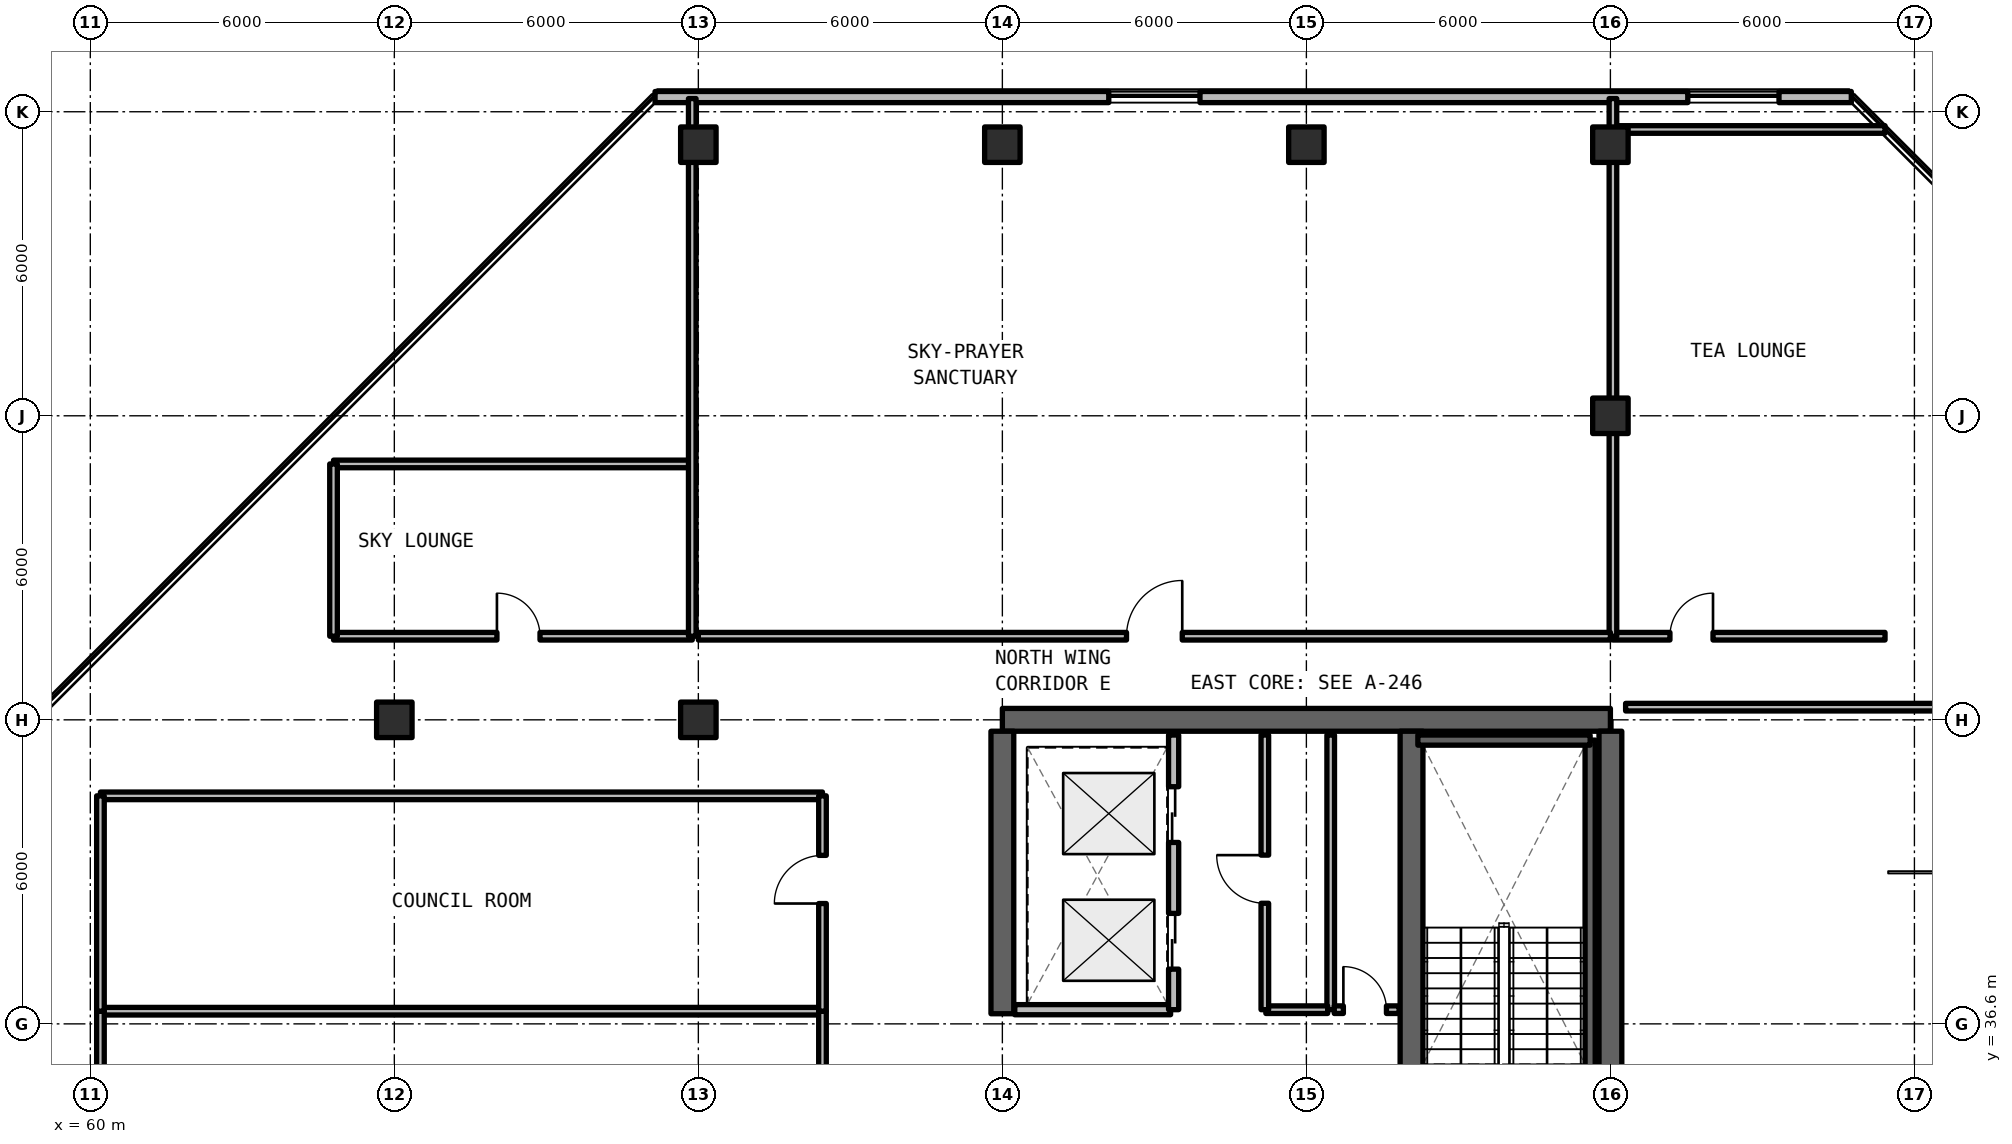
"""IFC4 building model, lengths in metres.
Left out: names, types, materials, properties, quantities, classifications, styles, units other than length and angle.
Written with IfcOpenShell. Run it as: python <this file> out.ifc"""

import sys

from ifc_helpers import new_model, si_unit, direction, frame, frame_2d, origin, origin_2d, place, context, subcontext, project, spatial, rectangle, extrude, element, fill, save


model = new_model("IFC4")
c1 = context("Model", 3, precision=1e-05, world=origin(), true_north=direction((0.0, 1.0)))
c2 = subcontext(c1, "Body", "Model", "MODEL_VIEW")
j1 = project(units=[si_unit("LENGTHUNIT", "METRE"), si_unit("PLANEANGLEUNIT", "RADIAN")], contexts=[c1])
p1 = place(None, origin())
s1 = spatial("IfcSite", under=j1, at=p1, CompositionType="ELEMENT")
p2 = place(p1, origin())
s2 = spatial("IfcBuilding", under=s1, at=p2, CompositionType="ELEMENT")
p3 = place(p2, frame((0.0, 0.0, 232.65)))
s3 = spatial("IfcBuildingStorey", under=s2, at=p3, CompositionType="ELEMENT", Elevation=232.65)
p4 = place(p3, frame((90.0, 42.6, 0.0), z_axis=(0.0, 0.0, 1.0), x_axis=(-1.0, 0.0, 0.0)))
e1 = element("IfcWall", 1, at=p4, inside=s3, PredefinedType="SHEAR", context=c2, shape_type="SweptSolid", body=[
    extrude(rectangle(XDim=12.0, YDim=0.45, at=frame_2d((6.0, 0.0))), origin(), (0.0, 0.0, 1.0), 3.3),
])
p5 = place(p3, frame((90.0, 24.825, 0.0), z_axis=(0.0, 0.0, 1.0), x_axis=(0.0, 1.0, 0.0)))
e2 = element("IfcWall", 2, at=p5, inside=s3, PredefinedType="SHEAR", context=c2, shape_type="SweptSolid", body=[
    extrude(rectangle(XDim=17.55, YDim=0.45, at=frame_2d((8.775, 0.0))), origin(), (0.0, 0.0, 1.0), 3.3),
])
p6 = place(p3, frame((78.0, 36.8, 0.0), z_axis=(0.0, 0.0, 1.0), x_axis=(0.0, 1.0, 0.0)))
e3 = element("IfcWall", 3, at=p6, inside=s3, PredefinedType="SHEAR", context=c2, shape_type="SweptSolid", body=[
    extrude(rectangle(XDim=5.575, YDim=0.45, at=frame_2d((2.788, 0.0))), origin(), (0.0, 0.0, 1.0), 3.3),
])
p7 = place(p3, frame((86.075, 24.825, 0.0), z_axis=(0.0, 0.0, 1.0), x_axis=(0.0, 1.0, 0.0)))
e4 = element("IfcWall", 4, at=p7, inside=s3, PredefinedType="SHEAR", context=c2, shape_type="SweptSolid", body=[
    extrude(rectangle(XDim=17.55, YDim=0.45, at=frame_2d((8.775, 0.0))), origin(), (0.0, 0.0, 1.0), 3.3),
])
p8 = place(p7, frame((0.425, 0.0, 0.0)))
e5 = element("IfcOpeningElement", 5, at=p8, cuts=e4, PredefinedType="OPENING", context=c2, shape_type="SweptSolid", body=[
    extrude(rectangle(XDim=1.15, YDim=2.15, at=frame_2d((0.575, 1.075))), frame((0.0, 0.235, 0.0), z_axis=(0.0, -1.0, 0.0), x_axis=(1.0, 0.0, 0.0)), (0.0, 0.0, 1.0), 0.47),
])
p9 = place(p7, frame((9.625, 0.0, 0.0)))
e6 = element("IfcOpeningElement", 6, at=p9, cuts=e4, PredefinedType="OPENING", context=c2, shape_type="SweptSolid", body=[
    extrude(rectangle(XDim=1.15, YDim=2.15, at=frame_2d((0.575, 1.075))), frame((0.0, 0.235, 0.0), z_axis=(0.0, -1.0, 0.0), x_axis=(1.0, 0.0, 0.0)), (0.0, 0.0, 1.0), 0.47),
])
for number, where, z_axis, x_axis in (
    (7, (66.0, 42.6, 0.0), (0.0, 0.0, 1.0), (1.0, 0.0, 0.0)),
    (8, (72.0, 42.6, 0.0), (0.0, 0.0, 1.0), (1.0, 0.0, 0.0)),
    (9, (90.0, 48.6, 0.0), (0.0, 0.0, 1.0), (1.0, 0.0, 0.0)),
    (10, (72.0, 53.95, 0.0), (0.0, 0.0, 1.0), (1.0, 0.0, 0.0)),
    (11, (78.0, 53.95, 0.0), (0.0, 0.0, 1.0), (1.0, 0.0, 0.0)),
    (12, (84.0, 53.95, 0.0), (0.0, 0.0, 1.0), (1.0, 0.0, 0.0)),
    (13, (90.0, 53.95, 0.0), (0.0, 0.0, 1.0), (1.0, 0.0, 0.0)),
):
    element("IfcColumn", number, at=place(p3, frame(where, z_axis=z_axis, x_axis=x_axis)), inside=s3, PredefinedType="COLUMN", context=c2, shape_type="SweptSolid", body=[
        extrude(rectangle(XDim=0.7, YDim=0.7, at=origin_2d()), origin(), (0.0, 0.0, 1.0), 3.3),
    ])
p10 = place(p3, frame((94.754, 54.89, 0.0), z_axis=(0.0, 0.0, 1.0), x_axis=(-1.0, 0.0, 0.0)))
e14 = element("IfcWall", 14, at=p10, inside=s3, PredefinedType="SOLIDWALL", context=c2, shape_type="SweptSolid", body=[
    extrude(rectangle(XDim=23.609, YDim=0.22, at=frame_2d((11.804, 0.0))), origin(), (0.0, 0.0, 1.0), 3.08),
])
p11 = place(p10, frame((1.427, 0.0, 0.78)))
e15 = element("IfcOpeningElement", 15, at=p11, cuts=e14, PredefinedType="OPENING", context=c2, shape_type="SweptSolid", body=[
    extrude(rectangle(XDim=1.8, YDim=1.66, at=frame_2d((0.9, 0.83))), frame((0.0, 0.12, 0.0), z_axis=(0.0, -1.0, 0.0), x_axis=(1.0, 0.0, 0.0)), (0.0, 0.0, 1.0), 0.24),
])
p12 = place(p10, frame((12.854, 0.0, 0.78)))
e16 = element("IfcOpeningElement", 16, at=p12, cuts=e14, PredefinedType="OPENING", context=c2, shape_type="SweptSolid", body=[
    extrude(rectangle(XDim=1.8, YDim=1.66, at=frame_2d((0.9, 0.83))), frame((0.0, 0.12, 0.0), z_axis=(0.0, -1.0, 0.0), x_axis=(1.0, 0.0, 0.0)), (0.0, 0.0, 1.0), 0.24),
])
p13 = place(p3, frame((84.48, 36.88, 0.0), z_axis=(0.0, 0.0, 1.0), x_axis=(0.0, 1.0, 0.0)))
e17 = element("IfcWall", 17, at=p13, inside=s3, PredefinedType="SOLIDWALL", context=c2, shape_type="SweptSolid", body=[
    extrude(rectangle(XDim=5.42, YDim=0.15, at=frame_2d((2.71, 0.0))), origin(), (0.0, 0.0, 1.0), 2.35),
])
p14 = place(p3, frame((84.55, 36.88, 0.0), z_axis=(0.0, 0.0, 1.0), x_axis=(1.0, 0.0, 0.0)))
e18 = element("IfcWall", 18, at=p14, inside=s3, PredefinedType="SOLIDWALL", context=c2, shape_type="SweptSolid", body=[
    extrude(rectangle(XDim=1.28, YDim=0.15, at=frame_2d((0.64, 0.0))), origin(), (0.0, 0.0, 1.0), 2.35),
])
p15 = place(p14, frame((0.18, 0.0, 0.0)))
e19 = element("IfcOpeningElement", 19, at=p15, cuts=e18, PredefinedType="OPENING", context=c2, shape_type="SweptSolid", body=[
    extrude(rectangle(XDim=0.85, YDim=2.1, at=frame_2d((0.425, 1.05))), frame((0.0, 0.085, 0.0), z_axis=(0.0, -1.0, 0.0), x_axis=(1.0, 0.0, 0.0)), (0.0, 0.0, 1.0), 0.17),
])
p16 = place(p3, frame((83.2, 36.88, 0.0), z_axis=(0.0, 0.0, 1.0), x_axis=(1.0, 0.0, 0.0)))
e20 = element("IfcWall", 20, at=p16, inside=s3, PredefinedType="SOLIDWALL", context=c2, shape_type="SweptSolid", body=[
    extrude(rectangle(XDim=1.22, YDim=0.15, at=frame_2d((0.61, 0.0))), origin(), (0.0, 0.0, 1.0), 2.35),
])
p17 = place(p3, frame((83.18, 36.88, 0.0), z_axis=(0.0, 0.0, 1.0), x_axis=(0.0, 1.0, 0.0)))
e21 = element("IfcWall", 21, at=p17, inside=s3, PredefinedType="SOLIDWALL", context=c2, shape_type="SweptSolid", body=[
    extrude(rectangle(XDim=5.42, YDim=0.15, at=frame_2d((2.71, 0.0))), origin(), (0.0, 0.0, 1.0), 2.35),
])
p18 = place(p17, frame((2.1, 0.0, 0.0)))
e22 = element("IfcOpeningElement", 22, at=p18, cuts=e21, PredefinedType="OPENING", context=c2, shape_type="SweptSolid", body=[
    extrude(rectangle(XDim=0.95, YDim=2.15, at=frame_2d((0.475, 1.075))), frame((0.0, 0.085, 0.0), z_axis=(0.0, -1.0, 0.0), x_axis=(1.0, 0.0, 0.0)), (0.0, 0.0, 1.0), 0.17),
])
p19 = place(p3, frame((78.245, 36.88, 0.0), z_axis=(0.0, 0.0, 1.0), x_axis=(1.0, 0.0, 0.0)))
e23 = element("IfcWall", 23, at=p19, inside=s3, PredefinedType="SOLIDWALL", context=c2, shape_type="SweptSolid", body=[
    extrude(rectangle(XDim=3.075, YDim=0.2, at=frame_2d((1.538, 0.0))), origin(), (0.0, 0.0, 1.0), 2.35),
])
p20 = place(p3, frame((81.38, 36.88, 0.0), z_axis=(0.0, 0.0, 1.0), x_axis=(0.0, 1.0, 0.0)))
e24 = element("IfcWall", 24, at=p20, inside=s3, PredefinedType="SOLIDWALL", context=c2, shape_type="SweptSolid", body=[
    extrude(rectangle(XDim=5.42, YDim=0.2, at=frame_2d((2.71, 0.0))), origin(), (0.0, 0.0, 1.0), 2.35),
])
p21 = place(p20, frame((0.8, 0.0, 0.0)))
e25 = element("IfcOpeningElement", 25, at=p21, cuts=e24, PredefinedType="OPENING", context=c2, shape_type="SweptSolid", body=[
    extrude(rectangle(XDim=1.1, YDim=2.2, at=frame_2d((0.55, 1.1))), frame((0.0, 0.11, 0.0), z_axis=(0.0, -1.0, 0.0), x_axis=(1.0, 0.0, 0.0)), (0.0, 0.0, 1.0), 0.22),
])
p22 = place(p20, frame((3.3, 0.0, 0.0)))
e26 = element("IfcOpeningElement", 26, at=p22, cuts=e24, PredefinedType="OPENING", context=c2, shape_type="SweptSolid", body=[
    extrude(rectangle(XDim=1.1, YDim=2.2, at=frame_2d((0.55, 1.1))), frame((0.0, 0.11, 0.0), z_axis=(0.0, -1.0, 0.0), x_axis=(1.0, 0.0, 0.0)), (0.0, 0.0, 1.0), 0.22),
])
p23 = place(p3, frame((64.8, 44.25, 0.0), z_axis=(0.0, 0.0, 1.0), x_axis=(1.0, 0.0, 0.0)))
e27 = element("IfcWall", 27, at=p23, inside=s3, PredefinedType="SOLIDWALL", context=c2, shape_type="SweptSolid", body=[
    extrude(rectangle(XDim=7.08, YDim=0.15, at=frame_2d((3.54, 0.0))), origin(), (0.0, 0.0, 1.0), 2.35),
])
p24 = place(p23, frame((3.225, 0.0, 0.0)))
e28 = element("IfcOpeningElement", 28, at=p24, cuts=e27, PredefinedType="OPENING", context=c2, shape_type="SweptSolid", body=[
    extrude(rectangle(XDim=0.85, YDim=2.1, at=frame_2d((0.425, 1.05))), frame((0.0, 0.085, 0.0), z_axis=(0.0, -1.0, 0.0), x_axis=(1.0, 0.0, 0.0)), (0.0, 0.0, 1.0), 0.17),
])
p25 = place(p3, frame((64.8, 47.65, 0.0), z_axis=(0.0, 0.0, 1.0), x_axis=(1.0, 0.0, 0.0)))
e29 = element("IfcWall", 29, at=p25, inside=s3, PredefinedType="SOLIDWALL", context=c2, shape_type="SweptSolid", body=[
    extrude(rectangle(XDim=7.08, YDim=0.15, at=frame_2d((3.54, 0.0))), origin(), (0.0, 0.0, 1.0), 2.35),
])
p26 = place(p3, frame((64.8, 44.25, 0.0), z_axis=(0.0, 0.0, 1.0), x_axis=(0.0, 1.0, 0.0)))
e30 = element("IfcWall", 30, at=p26, inside=s3, PredefinedType="SOLIDWALL", context=c2, shape_type="SweptSolid", body=[
    extrude(rectangle(XDim=3.4, YDim=0.15, at=frame_2d((1.7, 0.0))), origin(), (0.0, 0.0, 1.0), 2.35),
])
p27 = place(p3, frame((71.88, 44.25, 0.0), z_axis=(0.0, 0.0, 1.0), x_axis=(0.0, 1.0, 0.0)))
e31 = element("IfcWall", 31, at=p27, inside=s3, PredefinedType="SOLIDWALL", context=c2, shape_type="SweptSolid", body=[
    extrude(rectangle(XDim=10.61, YDim=0.15, at=frame_2d((5.305, 0.0))), origin(), (0.0, 0.0, 1.0), 2.35),
])
p28 = place(p3, frame((90.3, 42.85, 0.0), z_axis=(0.0, 0.0, 1.0), x_axis=(1.0, 0.0, 0.0)))
e32 = element("IfcWall", 32, at=p28, inside=s3, PredefinedType="SOLIDWALL", context=c2, shape_type="SweptSolid", body=[
    extrude(rectangle(XDim=8.52, YDim=0.15, at=frame_2d((4.26, 0.0))), origin(), (0.0, 0.0, 1.0), 2.35),
])
p29 = place(p3, frame((90.05, 44.25, 0.0), z_axis=(0.0, 0.0, 1.0), x_axis=(1.0, 0.0, 0.0)))
e33 = element("IfcWall", 33, at=p29, inside=s3, PredefinedType="SOLIDWALL", context=c2, shape_type="SweptSolid", body=[
    extrude(rectangle(XDim=5.37, YDim=0.15, at=frame_2d((2.685, 0.0))), origin(), (0.0, 0.0, 1.0), 2.35),
])
p30 = place(p29, frame((1.125, 0.0, 0.0)))
e34 = element("IfcOpeningElement", 34, at=p30, cuts=e33, PredefinedType="OPENING", context=c2, shape_type="SweptSolid", body=[
    extrude(rectangle(XDim=0.85, YDim=2.1, at=frame_2d((0.425, 1.05))), frame((0.0, 0.085, 0.0), z_axis=(0.0, -1.0, 0.0), x_axis=(1.0, 0.0, 0.0)), (0.0, 0.0, 1.0), 0.17),
])
p31 = place(p3, frame((90.05, 54.25, 0.0), z_axis=(0.0, 0.0, 1.0), x_axis=(1.0, 0.0, 0.0)))
e35 = element("IfcWall", 35, at=p31, inside=s3, PredefinedType="SOLIDWALL", context=c2, shape_type="SweptSolid", body=[
    extrude(rectangle(XDim=5.37, YDim=0.15, at=frame_2d((2.685, 0.0))), origin(), (0.0, 0.0, 1.0), 2.35),
])
p32 = place(p3, frame((90.05, 44.25, 0.0), z_axis=(0.0, 0.0, 1.0), x_axis=(0.0, 1.0, 0.0)))
e36 = element("IfcWall", 36, at=p32, inside=s3, PredefinedType="SOLIDWALL", context=c2, shape_type="SweptSolid", body=[
    extrude(rectangle(XDim=10.61, YDim=0.15, at=frame_2d((5.305, 0.0))), origin(), (0.0, 0.0, 1.0), 2.35),
])
p33 = place(p3, frame((72.0, 44.25, 0.0), z_axis=(0.0, 0.0, 1.0), x_axis=(1.0, 0.0, 0.0)))
e37 = element("IfcWall", 37, at=p33, inside=s3, PredefinedType="SOLIDWALL", context=c2, shape_type="SweptSolid", body=[
    extrude(rectangle(XDim=18.0, YDim=0.15, at=frame_2d((9.0, 0.0))), origin(), (0.0, 0.0, 1.0), 2.35),
])
p34 = place(p33, frame((8.45, 0.0, 0.0)))
e38 = element("IfcOpeningElement", 38, at=p34, cuts=e37, PredefinedType="OPENING", context=c2, shape_type="SweptSolid", body=[
    extrude(rectangle(XDim=1.1, YDim=2.15, at=frame_2d((0.55, 1.075))), frame((0.0, 0.085, 0.0), z_axis=(0.0, -1.0, 0.0), x_axis=(1.0, 0.0, 0.0)), (0.0, 0.0, 1.0), 0.17),
])
p35 = place(p3, frame((60.2, 36.85, 0.0), z_axis=(0.0, 0.0, 1.0), x_axis=(1.0, 0.0, 0.0)))
e39 = element("IfcWall", 39, at=p35, inside=s3, PredefinedType="SOLIDWALL", context=c2, shape_type="SweptSolid", body=[
    extrude(rectangle(XDim=14.25, YDim=0.15, at=frame_2d((7.125, 0.0))), origin(), (0.0, 0.0, 1.0), 2.35),
])
p36 = place(p3, frame((60.2, 31.25, 0.0), z_axis=(0.0, 0.0, 1.0), x_axis=(0.0, 1.0, 0.0)))
e40 = element("IfcWall", 40, at=p36, inside=s3, PredefinedType="SOLIDWALL", context=c2, shape_type="SweptSolid", body=[
    extrude(rectangle(XDim=5.6, YDim=0.15, at=frame_2d((2.8, 0.0))), origin(), (0.0, 0.0, 1.0), 2.35),
])
p37 = place(p3, frame((74.45, 31.25, 0.0), z_axis=(0.0, 0.0, 1.0), x_axis=(0.0, 1.0, 0.0)))
e41 = element("IfcWall", 41, at=p37, inside=s3, PredefinedType="SOLIDWALL", context=c2, shape_type="SweptSolid", body=[
    extrude(rectangle(XDim=5.6, YDim=0.15, at=frame_2d((2.8, 0.0))), origin(), (0.0, 0.0, 1.0), 2.35),
])
p38 = place(p37, frame((2.525, 0.0, 0.0)))
e42 = element("IfcOpeningElement", 42, at=p38, cuts=e41, PredefinedType="OPENING", context=c2, shape_type="SweptSolid", body=[
    extrude(rectangle(XDim=0.95, YDim=2.15, at=frame_2d((0.475, 1.075))), frame((0.0, 0.085, 0.0), z_axis=(0.0, -1.0, 0.0), x_axis=(1.0, 0.0, 0.0)), (0.0, 0.0, 1.0), 0.17),
])
p39 = place(p3, frame((60.2, 41.1, 0.0), z_axis=(0.0, 0.0, 1.0), x_axis=(1.0, 0.0, 0.0)))
e43 = element("IfcWall", 43, at=p39, inside=s3, PredefinedType="SOLIDWALL", context=c2, shape_type="SweptSolid", body=[
    extrude(rectangle(XDim=14.25, YDim=0.15, at=frame_2d((7.125, 0.0))), origin(), (0.0, 0.0, 1.0), 2.35),
])
p40 = place(p3, frame((60.2, 36.85, 0.0), z_axis=(0.0, 0.0, 1.0), x_axis=(0.0, 1.0, 0.0)))
e44 = element("IfcWall", 44, at=p40, inside=s3, PredefinedType="SOLIDWALL", context=c2, shape_type="SweptSolid", body=[
    extrude(rectangle(XDim=4.25, YDim=0.15, at=frame_2d((2.125, 0.0))), origin(), (0.0, 0.0, 1.0), 2.35),
])
p41 = place(p3, frame((74.45, 36.85, 0.0), z_axis=(0.0, 0.0, 1.0), x_axis=(0.0, 1.0, 0.0)))
e45 = element("IfcWall", 45, at=p41, inside=s3, PredefinedType="SOLIDWALL", context=c2, shape_type="SweptSolid", body=[
    extrude(rectangle(XDim=4.25, YDim=0.15, at=frame_2d((2.125, 0.0))), origin(), (0.0, 0.0, 1.0), 2.35),
])
p42 = place(p41, frame((2.125, 0.0, 0.0)))
e46 = element("IfcOpeningElement", 46, at=p42, cuts=e45, PredefinedType="OPENING", context=c2, shape_type="SweptSolid", body=[
    extrude(rectangle(XDim=0.95, YDim=2.15, at=frame_2d((0.475, 1.075))), frame((0.0, 0.085, 0.0), z_axis=(0.0, -1.0, 0.0), x_axis=(1.0, 0.0, 0.0)), (0.0, 0.0, 1.0), 0.17),
])
p43 = place(p3, frame((89.6, 34.2, 0.0), z_axis=(0.0, 0.0, 1.0), x_axis=(0.0, 1.0, 0.0)))
e47 = element("IfcWall", 47, at=p43, inside=s3, PredefinedType="SOLIDWALL", context=c2, shape_type="SweptSolid", body=[
    extrude(rectangle(XDim=8.0, YDim=0.2, at=frame_2d((4.0, 0.0))), origin(), (0.0, 0.0, 1.0), 3.3),
])
p44 = place(p3, frame((89.6, 42.2, 0.0), z_axis=(0.0, 0.0, 1.0), x_axis=(-1.0, 0.0, 0.0)))
e48 = element("IfcWall", 48, at=p44, inside=s3, PredefinedType="SOLIDWALL", context=c2, shape_type="SweptSolid", body=[
    extrude(rectangle(XDim=3.4, YDim=0.2, at=frame_2d((1.7, 0.0))), origin(), (0.0, 0.0, 1.0), 3.3),
])
p45 = place(p11, origin())
e49 = element("IfcWindow", 49, at=p45, inside=s3, PartitioningType="SINGLE_PANEL", PredefinedType="WINDOW", context=c2, shape_type="SweptSolid", body=[
    extrude(rectangle(XDim=1.8, YDim=1.66, at=frame_2d((0.9, 0.83))), frame((0.0, 0.03, 0.0), z_axis=(0.0, -1.0, 0.0), x_axis=(1.0, 0.0, 0.0)), (0.0, 0.0, 1.0), 0.06),
])
fill(e15, e49)
p46 = place(p12, origin())
e50 = element("IfcWindow", 50, at=p46, inside=s3, PartitioningType="SINGLE_PANEL", PredefinedType="WINDOW", context=c2, shape_type="SweptSolid", body=[
    extrude(rectangle(XDim=1.8, YDim=1.66, at=frame_2d((0.9, 0.83))), frame((0.0, 0.03, 0.0), z_axis=(0.0, -1.0, 0.0), x_axis=(1.0, 0.0, 0.0)), (0.0, 0.0, 1.0), 0.06),
])
fill(e16, e50)
p47 = place(p15, origin())
e51 = element("IfcDoor", 51, at=p47, inside=s3, OperationType="SINGLE_SWING_LEFT", PredefinedType="DOOR", context=c2, shape_type="SweptSolid", body=[
    extrude(rectangle(XDim=0.85, YDim=2.1, at=frame_2d((0.425, 1.05))), frame((0.0, 0.025, 0.0), z_axis=(0.0, -1.0, 0.0), x_axis=(1.0, 0.0, 0.0)), (0.0, 0.0, 1.0), 0.05),
])
fill(e19, e51)
p48 = place(p18, origin())
e52 = element("IfcDoor", 52, at=p48, inside=s3, OperationType="SINGLE_SWING_RIGHT", PredefinedType="DOOR", context=c2, shape_type="SweptSolid", body=[
    extrude(rectangle(XDim=0.95, YDim=2.15, at=frame_2d((0.475, 1.075))), frame((0.0, 0.025, 0.0), z_axis=(0.0, -1.0, 0.0), x_axis=(1.0, 0.0, 0.0)), (0.0, 0.0, 1.0), 0.05),
])
fill(e22, e52)
p49 = place(p21, origin())
e53 = element("IfcDoor", 53, at=p49, inside=s3, OperationType="SLIDING_TO_LEFT", PredefinedType="DOOR", context=c2, shape_type="SweptSolid", body=[
    extrude(rectangle(XDim=1.1, YDim=2.2, at=frame_2d((0.55, 1.1))), frame((0.0, 0.025, 0.0), z_axis=(0.0, -1.0, 0.0), x_axis=(1.0, 0.0, 0.0)), (0.0, 0.0, 1.0), 0.05),
])
fill(e25, e53)
p50 = place(p22, origin())
e54 = element("IfcDoor", 54, at=p50, inside=s3, OperationType="SLIDING_TO_RIGHT", PredefinedType="DOOR", context=c2, shape_type="SweptSolid", body=[
    extrude(rectangle(XDim=1.1, YDim=2.2, at=frame_2d((0.55, 1.1))), frame((0.0, 0.025, 0.0), z_axis=(0.0, -1.0, 0.0), x_axis=(1.0, 0.0, 0.0)), (0.0, 0.0, 1.0), 0.05),
])
fill(e26, e54)
p51 = place(p24, origin())
e55 = element("IfcDoor", 55, at=p51, inside=s3, OperationType="SINGLE_SWING_LEFT", PredefinedType="DOOR", context=c2, shape_type="SweptSolid", body=[
    extrude(rectangle(XDim=0.85, YDim=2.1, at=frame_2d((0.425, 1.05))), frame((0.0, 0.025, 0.0), z_axis=(0.0, -1.0, 0.0), x_axis=(1.0, 0.0, 0.0)), (0.0, 0.0, 1.0), 0.05),
])
fill(e28, e55)
p52 = place(p30, origin())
e56 = element("IfcDoor", 56, at=p52, inside=s3, OperationType="SINGLE_SWING_RIGHT", PredefinedType="DOOR", context=c2, shape_type="SweptSolid", body=[
    extrude(rectangle(XDim=0.85, YDim=2.1, at=frame_2d((0.425, 1.05))), frame((0.0, 0.025, 0.0), z_axis=(0.0, -1.0, 0.0), x_axis=(1.0, 0.0, 0.0)), (0.0, 0.0, 1.0), 0.05),
])
fill(e34, e56)
p53 = place(p34, origin())
e57 = element("IfcDoor", 57, at=p53, inside=s3, OperationType="SINGLE_SWING_RIGHT", PredefinedType="DOOR", context=c2, shape_type="SweptSolid", body=[
    extrude(rectangle(XDim=1.1, YDim=2.15, at=frame_2d((0.55, 1.075))), frame((0.0, 0.025, 0.0), z_axis=(0.0, -1.0, 0.0), x_axis=(1.0, 0.0, 0.0)), (0.0, 0.0, 1.0), 0.05),
])
fill(e38, e57)
p54 = place(p42, origin())
e58 = element("IfcDoor", 58, at=p54, inside=s3, OperationType="SINGLE_SWING_LEFT", PredefinedType="DOOR", context=c2, shape_type="SweptSolid", body=[
    extrude(rectangle(XDim=0.95, YDim=2.15, at=frame_2d((0.475, 1.075))), frame((0.0, 0.025, 0.0), z_axis=(0.0, -1.0, 0.0), x_axis=(1.0, 0.0, 0.0)), (0.0, 0.0, 1.0), 0.05),
])
fill(e46, e58)
save(model, sys.argv[1])
